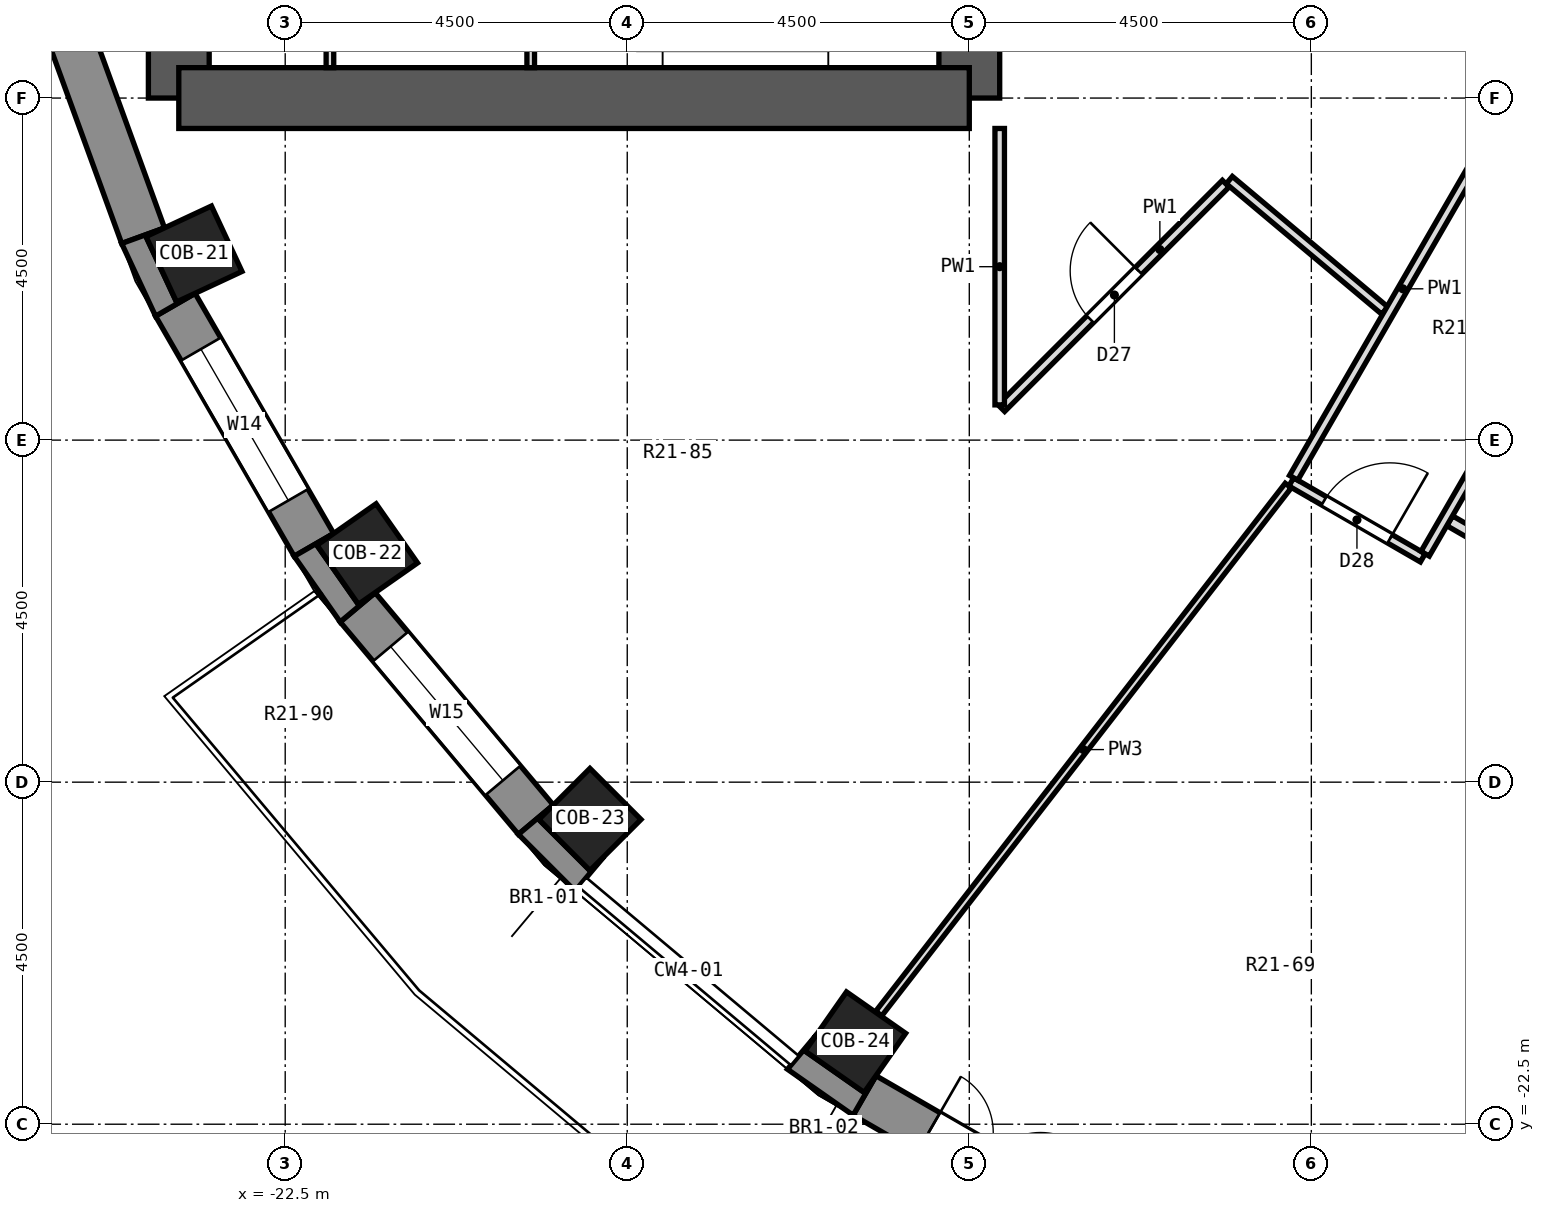
"""IFC4 building model, lengths in metres.
Left out: names, types, materials, properties, quantities, classifications, styles, units other than length and angle.
Written with IfcOpenShell. Run it as: python <this file> out.ifc"""

import sys

from ifc_helpers import new_model, si_unit, direction, frame, frame_2d, origin, origin_2d, place, context, subcontext, project, spatial, polyline, rectangle, outline, extrude, element, fill, save


model = new_model("IFC4")
c1 = context("Model", 3, precision=1e-05, world=origin(), true_north=direction((0.0, 1.0)))
c2 = subcontext(c1, "Body", "Model", "MODEL_VIEW")
j1 = project(units=[si_unit("LENGTHUNIT", "METRE"), si_unit("PLANEANGLEUNIT", "RADIAN")], contexts=[c1])
p1 = place(None, origin())
s1 = spatial("IfcSite", under=j1, at=p1, CompositionType="ELEMENT")
p2 = place(p1, origin())
s2 = spatial("IfcBuilding", under=s1, at=p2, CompositionType="ELEMENT")
p3 = place(p2, frame((0.0, 0.0, 131.5)))
s3 = spatial("IfcBuildingStorey", under=s2, at=p3, CompositionType="ELEMENT", Elevation=131.5)
for number, where, z_axis, x_axis in (
    (1, (-23.7, -11.052, 0.0), (0.0, 0.0, 1.0), (-0.906, -0.423, 0.0)),
    (2, (-21.421, -14.999, 0.0), (0.0, 0.0, 1.0), (-0.819, -0.574, 0.0)),
    (3, (-18.491, -18.491, 0.0), (0.0, 0.0, 1.0), (-0.707, -0.707, 0.0)),
    (4, (-14.999, -21.421, 0.0), (0.0, 0.0, 1.0), (-0.574, -0.819, 0.0)),
):
    element("IfcColumn", number, at=place(p3, frame(where, z_axis=z_axis, x_axis=x_axis)), inside=s3, PredefinedType="COLUMN", context=c2, shape_type="SweptSolid", body=[
        extrude(rectangle(XDim=0.95, YDim=0.95, at=origin_2d()), origin(), (0.0, 0.0, 1.0), 3.3),
    ])
p4 = place(p3, frame((-13.5, -9.0, 0.0), z_axis=(0.0, 0.0, 1.0), x_axis=(0.0, 1.0, 0.0)))
e5 = element("IfcWall", 5, at=p4, inside=s3, PredefinedType="SHEAR", context=c2, shape_type="SweptSolid", body=[
    extrude(rectangle(XDim=18.0, YDim=0.8, at=frame_2d((9.0, 0.0))), origin(), (0.0, 0.0, 1.0), 3.3),
])
p5 = place(p4, frame((15.4, 0.0, 0.0)))
e6 = element("IfcOpeningElement", 6, at=p5, cuts=e5, PredefinedType="OPENING", context=c2, shape_type="SweptSolid", body=[
    extrude(rectangle(XDim=1.2, YDim=2.1, at=frame_2d((0.6, 1.05))), frame((0.0, 0.412, 0.0), z_axis=(0.0, -1.0, 0.0), x_axis=(1.0, 0.0, 0.0)), (0.0, 0.0, 1.0), 0.824),
])
p6 = place(p4, frame((1.4, 0.0, 0.0)))
e7 = element("IfcOpeningElement", 7, at=p6, cuts=e5, PredefinedType="OPENING", context=c2, shape_type="SweptSolid", body=[
    extrude(rectangle(XDim=1.2, YDim=2.1, at=frame_2d((0.6, 1.05))), frame((0.0, 0.412, 0.0), z_axis=(0.0, -1.0, 0.0), x_axis=(1.0, 0.0, 0.0)), (0.0, 0.0, 1.0), 0.824),
])
p7 = place(p4, frame((7.5, 0.0, 0.0)))
e8 = element("IfcOpeningElement", 8, at=p7, cuts=e5, PredefinedType="OPENING", context=c2, shape_type="SweptSolid", body=[
    extrude(rectangle(XDim=3.0, YDim=2.4, at=frame_2d((1.5, 1.2))), frame((0.0, 0.412, 0.0), z_axis=(0.0, -1.0, 0.0), x_axis=(1.0, 0.0, 0.0)), (0.0, 0.0, 1.0), 0.824),
])
p8 = place(p3, frame((-23.9, -9.0, 0.0), z_axis=(0.0, 0.0, 1.0), x_axis=(0.0, 1.0, 0.0)))
e9 = element("IfcWall", 9, at=p8, inside=s3, PredefinedType="SHEAR", context=c2, shape_type="SweptSolid", body=[
    extrude(rectangle(XDim=18.0, YDim=0.8, at=frame_2d((9.0, 0.0))), origin(), (0.0, 0.0, 1.0), 3.3),
])
p9 = place(p3, frame((-13.5, -9.0, 0.0), z_axis=(0.0, 0.0, 1.0), x_axis=(-1.0, 0.0, 0.0)))
e10 = element("IfcWall", 10, at=p9, inside=s3, PredefinedType="SHEAR", context=c2, shape_type="SweptSolid", body=[
    extrude(rectangle(XDim=10.4, YDim=0.8, at=frame_2d((5.2, 0.0))), origin(), (0.0, 0.0, 1.0), 3.3),
])
p10 = place(p3, frame((-25.617, -7.383, 0.0), z_axis=(0.0, 0.0, 1.0), x_axis=(0.341990236633, -0.939703505393, 0.0)))
e11 = element("IfcWall", 11, at=p10, inside=s3, PredefinedType="SOLIDWALL", context=c2, shape_type="SweptSolid", body=[
    extrude(rectangle(XDim=3.648, YDim=0.6, at=frame_2d((1.824, 0.0))), origin(), (0.0, 0.0, 1.0), 2.8),
])
p11 = place(p3, frame((-23.946, -11.719, 0.0), z_axis=(0.0, 0.0, 1.0), x_axis=(0.499954196102, -0.866051847062, 0.0)))
e12 = element("IfcWall", 12, at=p11, inside=s3, PredefinedType="SOLIDWALL", context=c2, shape_type="SweptSolid", body=[
    extrude(rectangle(XDim=3.648, YDim=0.6, at=frame_2d((1.824, 0.0))), origin(), (0.0, 0.0, 1.0), 2.8),
])
p12 = place(p11, frame((0.674, 0.0, 0.9)))
e13 = element("IfcOpeningElement", 13, at=p12, cuts=e12, PredefinedType="OPENING", context=c2, shape_type="SweptSolid", body=[
    extrude(rectangle(XDim=2.3, YDim=1.8, at=frame_2d((1.15, 0.9))), frame((0.0, 0.312, 0.0), z_axis=(0.0, -1.0, 0.0), x_axis=(1.0, 0.0, 0.0)), (0.0, 0.0, 1.0), 0.624),
])
p13 = place(p3, frame((-21.547, -15.699, 0.0), z_axis=(0.0, 0.0, 1.0), x_axis=(0.642774476932, -0.766055462616, 0.0)))
e14 = element("IfcWall", 14, at=p13, inside=s3, PredefinedType="SOLIDWALL", context=c2, shape_type="SweptSolid", body=[
    extrude(rectangle(XDim=3.648, YDim=0.6, at=frame_2d((1.824, 0.0))), origin(), (0.0, 0.0, 1.0), 2.8),
])
p14 = place(p13, frame((0.674, 0.0, 0.9)))
e15 = element("IfcOpeningElement", 15, at=p14, cuts=e14, PredefinedType="OPENING", context=c2, shape_type="SweptSolid", body=[
    extrude(rectangle(XDim=2.3, YDim=1.8, at=frame_2d((1.15, 0.9))), frame((0.0, 0.312, 0.0), z_axis=(0.0, -1.0, 0.0), x_axis=(1.0, 0.0, 0.0)), (0.0, 0.0, 1.0), 0.624),
])
p15 = place(p3, frame((-14.878, -22.122, 0.0), z_axis=(0.0, 0.0, 1.0), x_axis=(0.866051847062, -0.499954196102, 0.0)))
e16 = element("IfcWall", 16, at=p15, inside=s3, PredefinedType="SOLIDWALL", context=c2, shape_type="SweptSolid", body=[
    extrude(rectangle(XDim=3.648, YDim=0.6, at=frame_2d((1.824, 0.0))), origin(), (0.0, 0.0, 1.0), 2.8),
])
p16 = place(p15, frame((0.974, 0.0, 0.0)))
e17 = element("IfcOpeningElement", 17, at=p16, cuts=e16, PredefinedType="OPENING", context=c2, shape_type="SweptSolid", body=[
    extrude(rectangle(XDim=1.7, YDim=2.4, at=frame_2d((0.85, 1.2))), frame((0.0, 0.312, 0.0), z_axis=(0.0, -1.0, 0.0), x_axis=(1.0, 0.0, 0.0)), (0.0, 0.0, 1.0), 0.624),
])
p17 = place(p3, origin())
e18 = element("IfcWall", 18, at=p17, inside=s3, PredefinedType="SOLIDWALL", context=c2, shape_type="SweptSolid", body=[
    extrude(outline(polyline([(-24.651, -10.913), (-24.206, -11.869), (-23.686, -11.569), (-23.93, -11.683), (-24.331, -10.822), (-24.087, -10.708), (-24.651, -10.913)])), origin(), (0.0, 0.0, 1.0), 2.8),
])
p18 = place(p3, origin())
e19 = element("IfcWall", 19, at=p18, inside=s3, PredefinedType="SOLIDWALL", context=c2, shape_type="SweptSolid", body=[
    extrude(outline(polyline([(-21.777, -15.892), (-21.317, -15.506), (-21.538, -15.661), (-22.083, -14.882), (-21.862, -14.728), (-22.382, -15.028), (-21.777, -15.892)])), origin(), (0.0, 0.0, 1.0), 2.8),
])
p19 = place(p3, origin())
e20 = element("IfcWall", 20, at=p19, inside=s3, PredefinedType="SOLIDWALL", context=c2, shape_type="SweptSolid", body=[
    extrude(outline(polyline([(-19.432, -18.686), (-18.686, -19.432), (-18.301, -18.972), (-18.491, -19.163), (-19.163, -18.491), (-18.972, -18.301), (-19.432, -18.686)])), origin(), (0.0, 0.0, 1.0), 2.8),
])
p20 = place(p3, origin())
e21 = element("IfcWall", 21, at=p20, inside=s3, PredefinedType="SOLIDWALL", context=c2, shape_type="SweptSolid", body=[
    extrude(outline(polyline([(-15.028, -22.382), (-14.728, -21.862), (-14.882, -22.083), (-15.661, -21.538), (-15.506, -21.317), (-15.892, -21.777), (-15.028, -22.382)])), origin(), (0.0, 0.0, 1.0), 2.8),
])
p21 = place(p3, frame((-10.079, -10.079, 0.0), z_axis=(0.0, 0.0, 1.0), x_axis=(0.766028909875, -0.642806121031, 0.0)))
e22 = element("IfcWall", 22, at=p21, inside=s3, PredefinedType="PARTITIONING", context=c2, shape_type="SweptSolid", body=[
    extrude(rectangle(XDim=2.671, YDim=0.125, at=frame_2d((1.335, 0.0))), origin(), (0.0, 0.0, 1.0), 2.8),
])
p22 = place(p3, frame((-9.264, -14.05, 0.0), z_axis=(0.0, 0.0, 1.0), x_axis=(0.866008543052, -0.500029202507, 0.0)))
e23 = element("IfcWall", 23, at=p22, inside=s3, PredefinedType="PARTITIONING", context=c2, shape_type="SweptSolid", body=[
    extrude(rectangle(XDim=1.998, YDim=0.125, at=frame_2d((0.999, 0.0))), origin(), (0.0, 0.0, 1.0), 2.8),
])
p23 = place(p22, frame((0.498, 0.0, 0.0)))
e24 = element("IfcOpeningElement", 24, at=p23, cuts=e23, PredefinedType="OPENING", context=c2, shape_type="SweptSolid", body=[
    extrude(rectangle(XDim=1.0, YDim=2.1, at=frame_2d((0.5, 1.05))), frame((0.0, 0.074, 0.0), z_axis=(0.0, -1.0, 0.0), x_axis=(1.0, 0.0, 0.0)), (0.0, 0.0, 1.0), 0.149),
])
p24 = place(p3, frame((-7.18, -14.561, 0.0), z_axis=(0.0, 0.0, 1.0), x_axis=(0.866071485186, -0.499920176176, 0.0)))
e25 = element("IfcWall", 25, at=p24, inside=s3, PredefinedType="PARTITIONING", context=c2, shape_type="SweptSolid", body=[
    extrude(rectangle(XDim=3.278, YDim=0.15, at=frame_2d((1.639, 0.0))), origin(), (0.0, 0.0, 1.0), 2.8),
])
p25 = place(p3, frame((-13.079, -13.079, 0.0), z_axis=(0.0, 0.0, 1.0), x_axis=(0.707106781187, 0.707106781187, 0.0)))
e26 = element("IfcWall", 26, at=p25, inside=s3, PredefinedType="PARTITIONING", context=c2, shape_type="SweptSolid", body=[
    extrude(rectangle(XDim=4.176, YDim=0.125, at=frame_2d((2.088, 0.0))), origin(), (0.0, 0.0, 1.0), 2.8),
])
p26 = place(p25, frame((1.654, 0.0, 0.0)))
e27 = element("IfcOpeningElement", 27, at=p26, cuts=e26, PredefinedType="OPENING", context=c2, shape_type="SweptSolid", body=[
    extrude(rectangle(XDim=0.9, YDim=2.1, at=frame_2d((0.45, 1.05))), frame((0.0, 0.074, 0.0), z_axis=(0.0, -1.0, 0.0), x_axis=(1.0, 0.0, 0.0)), (0.0, 0.0, 1.0), 0.149),
])
p27 = place(p3, frame((-14.691, -21.044, 0.0), z_axis=(0.0, 0.0, 1.0), x_axis=(0.612857497435, 0.79019344963, 0.0)))
e28 = element("IfcWall", 28, at=p27, inside=s3, PredefinedType="PARTITIONING", context=c2, shape_type="SweptSolid", body=[
    extrude(rectangle(XDim=8.79, YDim=0.1, at=frame_2d((4.395, 0.0))), origin(), (0.0, 0.0, 1.0), 2.8),
])
p28 = place(p3, frame((-7.503, -14.995, 0.0), z_axis=(0.0, 0.0, 1.0), x_axis=(0.500436522094, 0.865773230907, 0.0)))
e29 = element("IfcWall", 29, at=p28, inside=s3, PredefinedType="PARTITIONING", context=c2, shape_type="SweptSolid", body=[
    extrude(rectangle(XDim=5.682, YDim=0.125, at=frame_2d((2.841, 0.0))), origin(), (0.0, 0.0, 1.0), 2.8),
])
p29 = place(p3, frame((-9.233, -13.996, 0.0), z_axis=(0.0, 0.0, 1.0), x_axis=(0.500439738106, 0.865771371971, 0.0)))
e30 = element("IfcWall", 30, at=p29, inside=s3, PredefinedType="PARTITIONING", context=c2, shape_type="SweptSolid", body=[
    extrude(rectangle(XDim=5.744, YDim=0.125, at=frame_2d((2.872, 0.0))), origin(), (0.0, 0.0, 1.0), 2.8),
])
p30 = place(p3, frame((-13.1, -13.037, 0.0), z_axis=(0.0, 0.0, 1.0), x_axis=(0.0, 1.0, 0.0)))
e31 = element("IfcWall", 31, at=p30, inside=s3, PredefinedType="PARTITIONING", context=c2, shape_type="SweptSolid", body=[
    extrude(rectangle(XDim=3.637, YDim=0.125, at=frame_2d((1.818, 0.0))), origin(), (0.0, 0.0, 1.0), 2.8),
])
for number, where, z_axis, x_axis in (
    (32, (-19.27, -8.6, 0.0), (0.0, 0.0, 1.0), (0.0, 1.0, 0.0)),
    (33, (-21.912, -8.6, 0.0), (0.0, 0.0, 1.0), (0.0, 1.0, 0.0)),
):
    element("IfcWall", number, at=place(p3, frame(where, z_axis=z_axis, x_axis=x_axis)), inside=s3, PredefinedType="PARTITIONING", context=c2, shape_type="SweptSolid", body=[
        extrude(rectangle(XDim=3.35, YDim=0.1, at=frame_2d((1.675, 0.0))), origin(), (0.0, 0.0, 1.0), 2.8),
    ])
p31 = place(p12, origin())
e34 = element("IfcWindow", 34, at=p31, inside=s3, PartitioningType="SINGLE_PANEL", PredefinedType="WINDOW", context=c2, shape_type="SweptSolid", body=[
    extrude(rectangle(XDim=2.3, YDim=1.8, at=frame_2d((1.15, 0.9))), frame((0.0, 0.18, 0.0), z_axis=(0.0, -1.0, 0.0), x_axis=(1.0, 0.0, 0.0)), (0.0, 0.0, 1.0), 0.06),
])
fill(e13, e34)
p32 = place(p14, origin())
e35 = element("IfcWindow", 35, at=p32, inside=s3, PartitioningType="SINGLE_PANEL", PredefinedType="WINDOW", context=c2, shape_type="SweptSolid", body=[
    extrude(rectangle(XDim=2.3, YDim=1.8, at=frame_2d((1.15, 0.9))), frame((0.0, 0.18, 0.0), z_axis=(0.0, -1.0, 0.0), x_axis=(1.0, 0.0, 0.0)), (0.0, 0.0, 1.0), 0.06),
])
fill(e15, e35)
p33 = place(p16, origin())
e36 = element("IfcDoor", 36, at=p33, inside=s3, OperationType="DOUBLE_DOOR_SINGLE_SWING", PredefinedType="DOOR", context=c2, shape_type="SweptSolid", body=[
    extrude(rectangle(XDim=1.7, YDim=2.4, at=frame_2d((0.85, 1.2))), frame((0.0, 0.125, 0.0), z_axis=(0.0, -1.0, 0.0), x_axis=(1.0, 0.0, 0.0)), (0.0, 0.0, 1.0), 0.05),
])
fill(e17, e36)
p34 = place(p26, origin())
e37 = element("IfcDoor", 37, at=p34, inside=s3, OperationType="SINGLE_SWING_RIGHT", PredefinedType="DOOR", context=c2, shape_type="SweptSolid", body=[
    extrude(rectangle(XDim=0.9, YDim=2.1, at=frame_2d((0.45, 1.05))), frame((0.0, 0.025, 0.0), z_axis=(0.0, -1.0, 0.0), x_axis=(1.0, 0.0, 0.0)), (0.0, 0.0, 1.0), 0.05),
])
fill(e27, e37)
p35 = place(p23, origin())
e38 = element("IfcDoor", 38, at=p35, inside=s3, OperationType="SINGLE_SWING_RIGHT", PredefinedType="DOOR", context=c2, shape_type="SweptSolid", body=[
    extrude(rectangle(XDim=1.0, YDim=2.1, at=frame_2d((0.5, 1.05))), frame((0.0, 0.025, 0.0), z_axis=(0.0, -1.0, 0.0), x_axis=(1.0, 0.0, 0.0)), (0.0, 0.0, 1.0), 0.05),
])
fill(e24, e38)
save(model, sys.argv[1])
